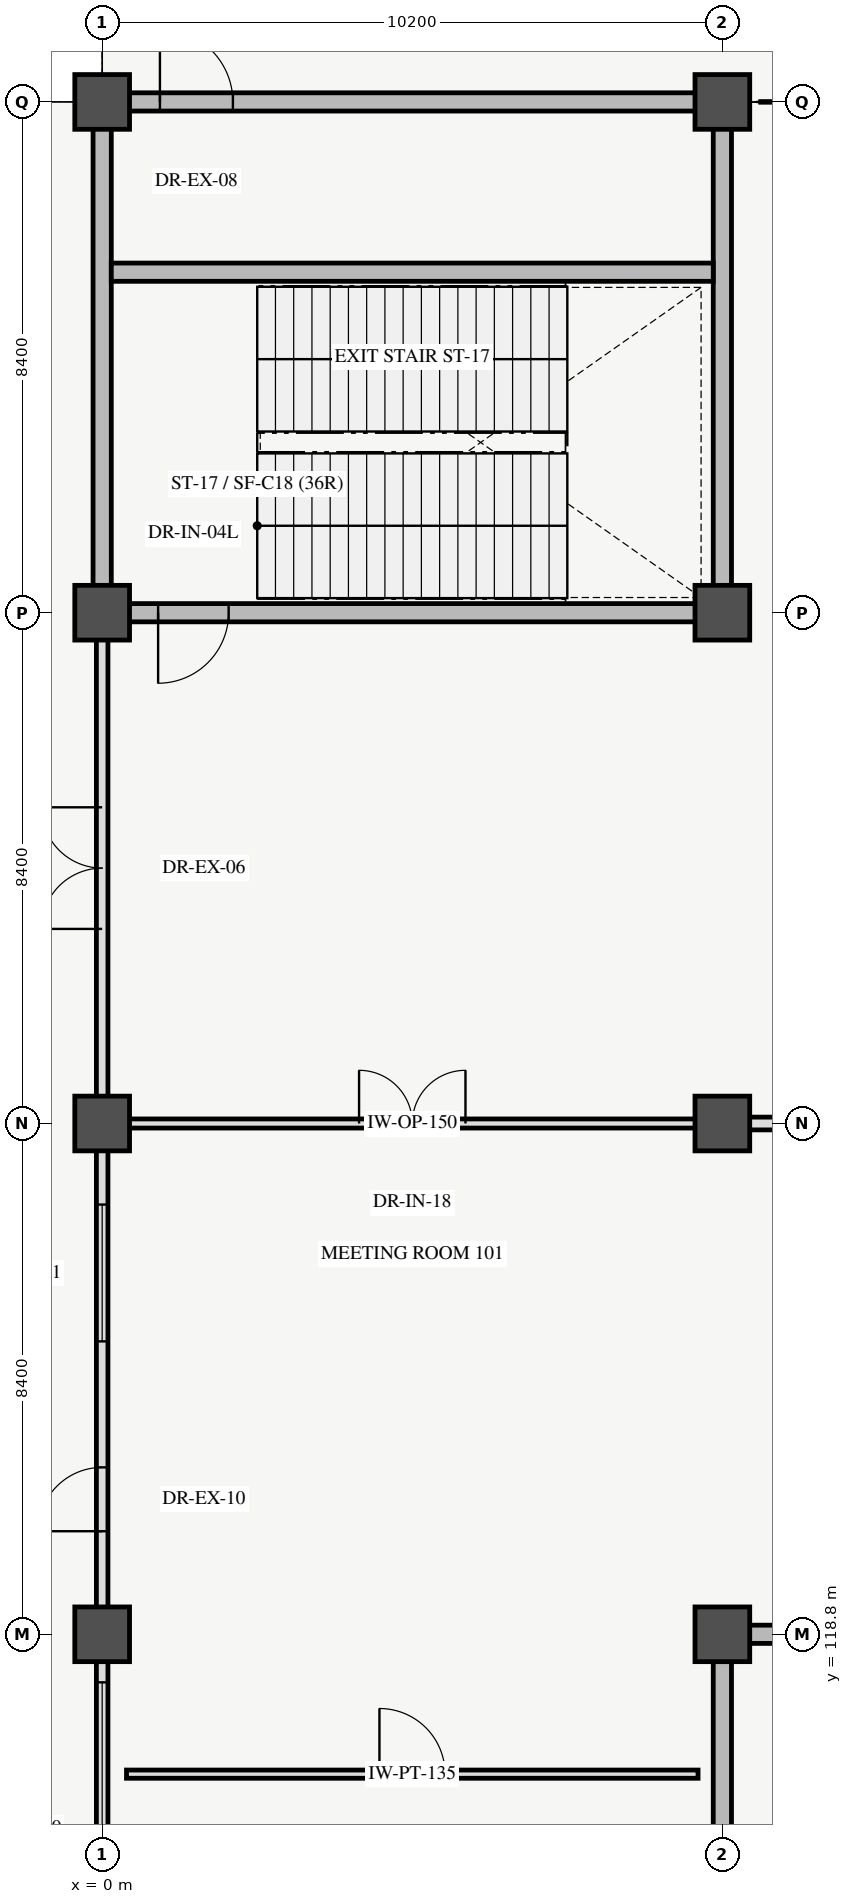
"""IFC4 building model, lengths in metres.
Left out: names, types, materials, properties, quantities, classifications, styles, units other than length and angle.
Written with IfcOpenShell. Run it as: python <this file> out.ifc"""

import sys

from ifc_helpers import new_model, si_unit, direction, frame, frame_2d, origin, origin_2d, place, context, subcontext, project, spatial, rectangle, extrude, element, fill, save


model = new_model("IFC4")
c1 = context("Model", 3, precision=1e-05, world=origin(), true_north=direction((0.0, 1.0)))
c2 = subcontext(c1, "Body", "Model", "MODEL_VIEW")
j1 = project(units=[si_unit("LENGTHUNIT", "METRE"), si_unit("PLANEANGLEUNIT", "RADIAN")], contexts=[c1])
p1 = place(None, origin())
s1 = spatial("IfcSite", under=j1, at=p1, CompositionType="ELEMENT")
p2 = place(p1, origin())
s2 = spatial("IfcBuilding", under=s1, at=p2, CompositionType="ELEMENT")
p3 = place(p2, origin())
s3 = spatial("IfcBuildingStorey", under=s2, at=p3, CompositionType="ELEMENT", Elevation=0.0)
for number, where, z_axis, x_axis in (
    (1, (0.0, 118.8, 0.0), (0.0, 0.0, 1.0), (1.0, 0.0, 0.0)),
    (2, (0.0, 127.2, 0.0), (0.0, 0.0, 1.0), (1.0, 0.0, 0.0)),
    (3, (0.0, 135.6, 0.0), (0.0, 0.0, 1.0), (1.0, 0.0, 0.0)),
    (4, (0.0, 144.0, 0.0), (0.0, 0.0, 1.0), (1.0, 0.0, 0.0)),
    (5, (10.2, 118.8, 0.0), (0.0, 0.0, 1.0), (1.0, 0.0, 0.0)),
    (6, (10.2, 127.2, 0.0), (0.0, 0.0, 1.0), (1.0, 0.0, 0.0)),
    (7, (10.2, 135.6, 0.0), (0.0, 0.0, 1.0), (1.0, 0.0, 0.0)),
    (8, (10.2, 144.0, 0.0), (0.0, 0.0, 1.0), (1.0, 0.0, 0.0)),
):
    element("IfcColumn", number, at=place(p3, frame(where, z_axis=z_axis, x_axis=x_axis)), inside=s3, PredefinedType="COLUMN", context=c2, shape_type="SweptSolid", body=[
        extrude(rectangle(XDim=0.9, YDim=0.9, at=origin_2d()), origin(), (0.0, 0.0, 1.0), 5.4),
    ])
p4 = place(p3, frame((10.2, 118.8, 0.0), z_axis=(0.0, 0.0, 1.0), x_axis=(1.0, 0.0, 0.0)))
e9 = element("IfcWall", 9, at=p4, inside=s3, PredefinedType="SHEAR", context=c2, shape_type="SweptSolid", body=[
    extrude(rectangle(XDim=10.2, YDim=0.3, at=frame_2d((5.1, 0.0))), origin(), (0.0, 0.0, 1.0), 5.4),
])
p5 = place(p4, frame((7.4, 0.0, 0.0)))
e10 = element("IfcOpeningElement", 10, at=p5, cuts=e9, PredefinedType="OPENING", context=c2, shape_type="SweptSolid", body=[
    extrude(rectangle(XDim=1.1, YDim=2.2, at=frame_2d((0.55, 1.1))), frame((0.0, 0.16, 0.0), z_axis=(0.0, -1.0, 0.0), x_axis=(1.0, 0.0, 0.0)), (0.0, 0.0, 1.0), 0.32),
])
p6 = place(p3, frame((10.2, 109.2, 0.0), z_axis=(0.0, 0.0, 1.0), x_axis=(0.0, 1.0, 0.0)))
e11 = element("IfcWall", 11, at=p6, inside=s3, PredefinedType="SHEAR", context=c2, shape_type="SweptSolid", body=[
    extrude(rectangle(XDim=9.6, YDim=0.3, at=frame_2d((4.8, 0.0))), origin(), (0.0, 0.0, 1.0), 5.4),
])
p7 = place(p3, frame((0.0, 109.44, 0.0), z_axis=(0.0, 0.0, 1.0), x_axis=(0.0, 1.0, 0.0)))
e12 = element("IfcWall", 12, at=p7, inside=s3, PredefinedType="STANDARD", context=c2, shape_type="SweptSolid", body=[
    extrude(rectangle(XDim=9.12, YDim=0.19, at=frame_2d((4.56, 0.0))), origin(), (0.0, 0.0, 1.0), 3.68),
])
p8 = place(p7, frame((1.38, 0.0, 0.0)))
e13 = element("IfcOpeningElement", 13, at=p8, cuts=e12, PredefinedType="OPENING", context=c2, shape_type="SweptSolid", body=[
    extrude(rectangle(XDim=1.8, YDim=2.25, at=frame_2d((0.9, 1.125))), frame((0.0, 0.105, 0.0), z_axis=(0.0, -1.0, 0.0), x_axis=(1.0, 0.0, 0.0)), (0.0, 0.0, 1.0), 0.21),
])
p9 = place(p7, frame((3.77, 0.0, 0.9)))
e14 = element("IfcOpeningElement", 14, at=p9, cuts=e12, PredefinedType="OPENING", context=c2, shape_type="SweptSolid", body=[
    extrude(rectangle(XDim=4.8, YDim=2.25, at=frame_2d((2.4, 1.125))), frame((0.0, 0.105, 0.0), z_axis=(0.0, -1.0, 0.0), x_axis=(1.0, 0.0, 0.0)), (0.0, 0.0, 1.0), 0.21),
])
p10 = place(p3, frame((0.0, 119.04, 0.0), z_axis=(0.0, 0.0, 1.0), x_axis=(0.0, 1.0, 0.0)))
e15 = element("IfcWall", 15, at=p10, inside=s3, PredefinedType="STANDARD", context=c2, shape_type="SweptSolid", body=[
    extrude(rectangle(XDim=7.92, YDim=0.19, at=frame_2d((3.96, 0.0))), origin(), (0.0, 0.0, 1.0), 3.68),
])
p11 = place(p10, frame((1.455, 0.0, 0.0)))
e16 = element("IfcOpeningElement", 16, at=p11, cuts=e15, PredefinedType="OPENING", context=c2, shape_type="SweptSolid", body=[
    extrude(rectangle(XDim=1.05, YDim=2.15, at=frame_2d((0.525, 1.075))), frame((0.0, 0.105, 0.0), z_axis=(0.0, -1.0, 0.0), x_axis=(1.0, 0.0, 0.0)), (0.0, 0.0, 1.0), 0.21),
])
p12 = place(p10, frame((4.577, 0.0, 0.9)))
e17 = element("IfcOpeningElement", 17, at=p12, cuts=e15, PredefinedType="OPENING", context=c2, shape_type="SweptSolid", body=[
    extrude(rectangle(XDim=2.25, YDim=1.95, at=frame_2d((1.125, 0.975))), frame((0.0, 0.105, 0.0), z_axis=(0.0, -1.0, 0.0), x_axis=(1.0, 0.0, 0.0)), (0.0, 0.0, 1.0), 0.21),
])
p13 = place(p3, frame((0.0, 127.44, 0.0), z_axis=(0.0, 0.0, 1.0), x_axis=(0.0, 1.0, 0.0)))
e18 = element("IfcWall", 18, at=p13, inside=s3, PredefinedType="STANDARD", context=c2, shape_type="SweptSolid", body=[
    extrude(rectangle(XDim=7.92, YDim=0.19, at=frame_2d((3.96, 0.0))), origin(), (0.0, 0.0, 1.0), 3.68),
])
p14 = place(p13, frame((2.96, 0.0, 0.0)))
e19 = element("IfcOpeningElement", 19, at=p14, cuts=e18, PredefinedType="OPENING", context=c2, shape_type="SweptSolid", body=[
    extrude(rectangle(XDim=2.0, YDim=2.3, at=frame_2d((1.0, 1.15))), frame((0.0, 0.105, 0.0), z_axis=(0.0, -1.0, 0.0), x_axis=(1.0, 0.0, 0.0)), (0.0, 0.0, 1.0), 0.21),
])
p15 = place(p3, frame((0.0, 135.6, 0.0), z_axis=(0.0, 0.0, 1.0), x_axis=(1.0, 0.0, 0.0)))
e20 = element("IfcWall", 20, at=p15, inside=s3, PredefinedType="SHEAR", context=c2, shape_type="SweptSolid", body=[
    extrude(rectangle(XDim=10.2, YDim=0.3, at=frame_2d((5.1, 0.0))), origin(), (0.0, 0.0, 1.0), 5.4),
])
p16 = place(p15, frame((0.92, 0.0, 0.0)))
e21 = element("IfcOpeningElement", 21, at=p16, cuts=e20, PredefinedType="OPENING", context=c2, shape_type="SweptSolid", body=[
    extrude(rectangle(XDim=1.16, YDim=2.2, at=frame_2d((0.58, 1.1))), frame((0.0, 0.16, 0.0), z_axis=(0.0, -1.0, 0.0), x_axis=(1.0, 0.0, 0.0)), (0.0, 0.0, 1.0), 0.32),
])
p17 = place(p3, frame((0.0, 144.0, 0.0), z_axis=(0.0, 0.0, 1.0), x_axis=(1.0, 0.0, 0.0)))
e22 = element("IfcWall", 22, at=p17, inside=s3, PredefinedType="SHEAR", context=c2, shape_type="SweptSolid", body=[
    extrude(rectangle(XDim=10.2, YDim=0.3, at=frame_2d((5.1, 0.0))), origin(), (0.0, 0.0, 1.0), 5.4),
])
p18 = place(p17, frame((0.95, 0.0, 0.0)))
e23 = element("IfcOpeningElement", 23, at=p18, cuts=e22, PredefinedType="OPENING", context=c2, shape_type="SweptSolid", body=[
    extrude(rectangle(XDim=1.2, YDim=2.2, at=frame_2d((0.6, 1.1))), frame((0.0, 0.16, 0.0), z_axis=(0.0, -1.0, 0.0), x_axis=(1.0, 0.0, 0.0)), (0.0, 0.0, 1.0), 0.32),
])
for number, where, z_axis, x_axis in (
    (24, (0.0, 135.6, 0.0), (0.0, 0.0, 1.0), (0.0, 1.0, 0.0)),
    (25, (10.2, 135.6, 0.0), (0.0, 0.0, 1.0), (0.0, 1.0, 0.0)),
):
    element("IfcWall", number, at=place(p3, frame(where, z_axis=z_axis, x_axis=x_axis)), inside=s3, PredefinedType="SHEAR", context=c2, shape_type="SweptSolid", body=[
        extrude(rectangle(XDim=8.4, YDim=0.3, at=frame_2d((4.2, 0.0))), origin(), (0.0, 0.0, 1.0), 5.4),
    ])
p19 = place(p3, frame((0.15, 141.2, 0.0), z_axis=(0.0, 0.0, 1.0), x_axis=(1.0, 0.0, 0.0)))
e26 = element("IfcWall", 26, at=p19, inside=s3, PredefinedType="SHEAR", context=c2, shape_type="SweptSolid", body=[
    extrude(rectangle(XDim=9.9, YDim=0.3, at=frame_2d((4.95, 0.0))), origin(), (0.0, 0.0, 1.0), 5.4),
])
p20 = place(p3, frame((0.4, 127.2, 0.0), z_axis=(0.0, 0.0, 1.0), x_axis=(1.0, 0.0, 0.0)))
e27 = element("IfcWall", 27, at=p20, inside=s3, PredefinedType="MOVABLE", context=c2, shape_type="SweptSolid", body=[
    extrude(rectangle(XDim=9.4, YDim=0.15, at=frame_2d((4.7, 0.0))), origin(), (0.0, 0.0, 1.0), 4.08),
])
p21 = place(p20, frame((3.825, 0.0, 0.0)))
e28 = element("IfcOpeningElement", 28, at=p21, cuts=e27, PredefinedType="OPENING", context=c2, shape_type="SweptSolid", body=[
    extrude(rectangle(XDim=1.75, YDim=2.28, at=frame_2d((0.875, 1.14))), frame((0.0, 0.085, 0.0), z_axis=(0.0, -1.0, 0.0), x_axis=(1.0, 0.0, 0.0)), (0.0, 0.0, 1.0), 0.17),
])
p22 = place(p3, frame((10.6, 127.2, 0.0), z_axis=(0.0, 0.0, 1.0), x_axis=(1.0, 0.0, 0.0)))
e29 = element("IfcWall", 29, at=p22, inside=s3, PredefinedType="MOVABLE", context=c2, shape_type="SweptSolid", body=[
    extrude(rectangle(XDim=9.4, YDim=0.21, at=frame_2d((4.7, 0.0))), origin(), (0.0, 0.0, 1.0), 4.08),
])
p23 = place(p22, frame((3.775, 0.0, 0.0)))
e30 = element("IfcOpeningElement", 30, at=p23, cuts=e29, PredefinedType="OPENING", context=c2, shape_type="SweptSolid", body=[
    extrude(rectangle(XDim=1.85, YDim=2.32, at=frame_2d((0.925, 1.16))), frame((0.0, 0.115, 0.0), z_axis=(0.0, -1.0, 0.0), x_axis=(1.0, 0.0, 0.0)), (0.0, 0.0, 1.0), 0.23),
])
p24 = place(p3, frame((0.4, 116.5, 0.0), z_axis=(0.0, 0.0, 1.0), x_axis=(1.0, 0.0, 0.0)))
e31 = element("IfcWall", 31, at=p24, inside=s3, PredefinedType="PARTITIONING", context=c2, shape_type="SweptSolid", body=[
    extrude(rectangle(XDim=9.4, YDim=0.135, at=frame_2d((4.7, 0.0))), origin(), (0.0, 0.0, 1.0), 4.08),
])
p25 = place(p24, frame((4.16, 0.0, 0.0)))
e32 = element("IfcOpeningElement", 32, at=p25, cuts=e31, PredefinedType="OPENING", context=c2, shape_type="SweptSolid", body=[
    extrude(rectangle(XDim=1.08, YDim=2.18, at=frame_2d((0.54, 1.09))), frame((0.0, 0.077, 0.0), z_axis=(0.0, -1.0, 0.0), x_axis=(1.0, 0.0, 0.0)), (0.0, 0.0, 1.0), 0.155),
])
p26 = place(p9, origin())
e33 = element("IfcWindow", 33, at=p26, inside=s3, PartitioningType="TRIPLE_PANEL_VERTICAL", PredefinedType="WINDOW", context=c2, shape_type="SweptSolid", body=[
    extrude(rectangle(XDim=4.8, YDim=2.25, at=frame_2d((2.4, 1.125))), frame((0.0, 0.03, 0.0), z_axis=(0.0, -1.0, 0.0), x_axis=(1.0, 0.0, 0.0)), (0.0, 0.0, 1.0), 0.06),
])
fill(e14, e33)
p27 = place(p11, origin())
e34 = element("IfcDoor", 34, at=p27, inside=s3, OperationType="SINGLE_SWING_LEFT", PredefinedType="DOOR", context=c2, shape_type="SweptSolid", body=[
    extrude(rectangle(XDim=1.05, YDim=2.15, at=frame_2d((0.525, 1.075))), frame((0.0, 0.025, 0.0), z_axis=(0.0, -1.0, 0.0), x_axis=(1.0, 0.0, 0.0)), (0.0, 0.0, 1.0), 0.05),
])
fill(e16, e34)
p28 = place(p12, origin())
e35 = element("IfcWindow", 35, at=p28, inside=s3, PartitioningType="DOUBLE_PANEL_VERTICAL", PredefinedType="WINDOW", context=c2, shape_type="SweptSolid", body=[
    extrude(rectangle(XDim=2.25, YDim=1.95, at=frame_2d((1.125, 0.975))), frame((0.0, 0.03, 0.0), z_axis=(0.0, -1.0, 0.0), x_axis=(1.0, 0.0, 0.0)), (0.0, 0.0, 1.0), 0.06),
])
fill(e17, e35)
p29 = place(p14, origin())
e36 = element("IfcDoor", 36, at=p29, inside=s3, OperationType="DOUBLE_DOOR_SINGLE_SWING", PredefinedType="DOOR", context=c2, shape_type="SweptSolid", body=[
    extrude(rectangle(XDim=2.0, YDim=2.3, at=frame_2d((1.0, 1.15))), frame((0.0, 0.025, 0.0), z_axis=(0.0, -1.0, 0.0), x_axis=(1.0, 0.0, 0.0)), (0.0, 0.0, 1.0), 0.05),
])
fill(e19, e36)
p30 = place(p16, origin())
e37 = element("IfcDoor", 37, at=p30, inside=s3, OperationType="SINGLE_SWING_LEFT", PredefinedType="DOOR", context=c2, shape_type="SweptSolid", body=[
    extrude(rectangle(XDim=1.16, YDim=2.2, at=frame_2d((0.58, 1.1))), frame((0.0, 0.025, 0.0), z_axis=(0.0, -1.0, 0.0), x_axis=(1.0, 0.0, 0.0)), (0.0, 0.0, 1.0), 0.05),
])
fill(e21, e37)
p31 = place(p18, origin())
e38 = element("IfcDoor", 38, at=p31, inside=s3, OperationType="SINGLE_SWING_LEFT", PredefinedType="DOOR", context=c2, shape_type="SweptSolid", body=[
    extrude(rectangle(XDim=1.2, YDim=2.2, at=frame_2d((0.6, 1.1))), frame((0.0, 0.025, 0.0), z_axis=(0.0, -1.0, 0.0), x_axis=(1.0, 0.0, 0.0)), (0.0, 0.0, 1.0), 0.05),
])
fill(e23, e38)
p32 = place(p21, origin())
e39 = element("IfcDoor", 39, at=p32, inside=s3, OperationType="DOUBLE_DOOR_SINGLE_SWING", PredefinedType="DOOR", context=c2, shape_type="SweptSolid", body=[
    extrude(rectangle(XDim=1.75, YDim=2.28, at=frame_2d((0.875, 1.14))), frame((0.0, 0.025, 0.0), z_axis=(0.0, -1.0, 0.0), x_axis=(1.0, 0.0, 0.0)), (0.0, 0.0, 1.0), 0.05),
])
fill(e28, e39)
p33 = place(p25, origin())
e40 = element("IfcDoor", 40, at=p33, inside=s3, OperationType="SINGLE_SWING_LEFT", PredefinedType="DOOR", context=c2, shape_type="SweptSolid", body=[
    extrude(rectangle(XDim=1.08, YDim=2.18, at=frame_2d((0.54, 1.09))), frame((0.0, 0.025, 0.0), z_axis=(0.0, -1.0, 0.0), x_axis=(1.0, 0.0, 0.0)), (0.0, 0.0, 1.0), 0.05),
])
fill(e32, e40)
save(model, sys.argv[1])
